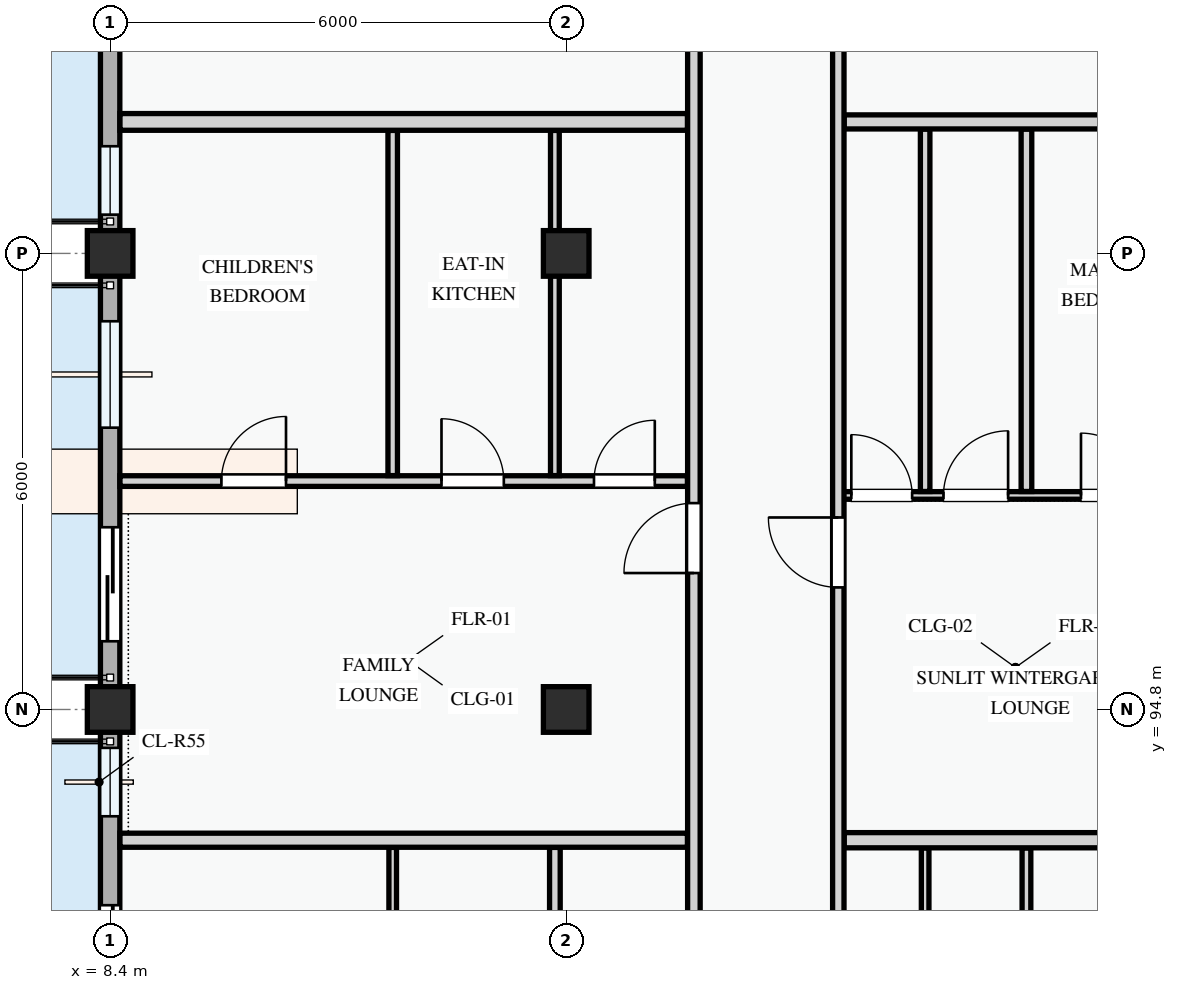
"""IFC4 building model, lengths in metres.
Left out: names, types, materials, properties, quantities, classifications, styles, units other than length and angle.
Written with IfcOpenShell. Run it as: python <this file> out.ifc"""

import sys

from ifc_helpers import new_model, si_unit, direction, frame, frame_2d, origin, origin_2d, place, context, subcontext, project, spatial, rectangle, extrude, element, fill, save


model = new_model("IFC4")
c1 = context("Model", 3, precision=1e-05, world=origin(), true_north=direction((0.0, 1.0)))
c2 = subcontext(c1, "Body", "Model", "MODEL_VIEW")
j1 = project(units=[si_unit("LENGTHUNIT", "METRE"), si_unit("PLANEANGLEUNIT", "RADIAN")], contexts=[c1])
p1 = place(None, origin())
s1 = spatial("IfcSite", under=j1, at=p1, CompositionType="ELEMENT")
p2 = place(p1, origin())
s2 = spatial("IfcBuilding", under=s1, at=p2, CompositionType="ELEMENT")
p3 = place(p2, frame((0.0, 0.0, 37.8)))
s3 = spatial("IfcBuildingStorey", under=s2, at=p3, CompositionType="ELEMENT", Elevation=37.8)
for number, where, z_axis, x_axis in (
    (1, (8.4, 94.8, 0.0), (0.0, 0.0, 1.0), (1.0, 0.0, 0.0)),
    (2, (8.4, 100.8, 0.0), (0.0, 0.0, 1.0), (1.0, 0.0, 0.0)),
    (3, (14.4, 94.8, 0.0), (0.0, 0.0, 1.0), (1.0, 0.0, 0.0)),
    (4, (14.4, 100.8, 0.0), (0.0, 0.0, 1.0), (1.0, 0.0, 0.0)),
):
    element("IfcColumn", number, at=place(p3, frame(where, z_axis=z_axis, x_axis=x_axis)), inside=s3, PredefinedType="COLUMN", context=c2, shape_type="SweptSolid", body=[
        extrude(rectangle(XDim=0.6, YDim=0.6, at=origin_2d()), origin(), (0.0, 0.0, 1.0), 3.3),
    ])
p4 = place(p3, frame((8.4, 109.2, 0.0), z_axis=(0.0, 0.0, 1.0), x_axis=(0.0, -1.0, 0.0)))
e5 = element("IfcWall", 5, at=p4, inside=s3, PredefinedType="STANDARD", context=c2, shape_type="SweptSolid", body=[
    extrude(rectangle(XDim=8.4, YDim=0.255, at=frame_2d((4.2, 0.0))), origin(), (0.0, 0.0, 1.0), 2.425),
])
p5 = place(p4, frame((4.268, 0.0, 0.0)))
e6 = element("IfcOpeningElement", 6, at=p5, cuts=e5, PredefinedType="OPENING", context=c2, shape_type="SweptSolid", body=[
    extrude(rectangle(XDim=1.4, YDim=2.2, at=frame_2d((0.7, 1.1))), frame((0.0, 0.137, 0.0), z_axis=(0.0, -1.0, 0.0), x_axis=(1.0, 0.0, 0.0)), (0.0, 0.0, 1.0), 0.275),
])
p6 = place(p4, frame((0.488, 0.0, 0.78)))
e7 = element("IfcOpeningElement", 7, at=p6, cuts=e5, PredefinedType="OPENING", context=c2, shape_type="SweptSolid", body=[
    extrude(rectangle(XDim=2.48, YDim=1.46, at=frame_2d((1.24, 0.73))), frame((0.0, 0.137, 0.0), z_axis=(0.0, -1.0, 0.0), x_axis=(1.0, 0.0, 0.0)), (0.0, 0.0, 1.0), 0.275),
])
p7 = place(p4, frame((6.99, 0.0, 0.78)))
e8 = element("IfcOpeningElement", 8, at=p7, cuts=e5, PredefinedType="OPENING", context=c2, shape_type="SweptSolid", body=[
    extrude(rectangle(XDim=0.9, YDim=1.2, at=frame_2d((0.45, 0.6))), frame((0.0, 0.137, 0.0), z_axis=(0.0, -1.0, 0.0), x_axis=(1.0, 0.0, 0.0)), (0.0, 0.0, 1.0), 0.275),
])
p8 = place(p3, frame((8.4, 100.8, 0.0), z_axis=(0.0, 0.0, 1.0), x_axis=(0.0, -1.0, 0.0)))
e9 = element("IfcWall", 9, at=p8, inside=s3, PredefinedType="STANDARD", context=c2, shape_type="SweptSolid", body=[
    extrude(rectangle(XDim=6.0, YDim=0.255, at=frame_2d((3.0, 0.0))), origin(), (0.0, 0.0, 1.0), 2.575),
])
p9 = place(p8, frame((3.603, 0.0, 0.0)))
e10 = element("IfcOpeningElement", 10, at=p9, cuts=e9, PredefinedType="OPENING", context=c2, shape_type="SweptSolid", body=[
    extrude(rectangle(XDim=1.5, YDim=2.2, at=frame_2d((0.75, 1.1))), frame((0.0, 0.137, 0.0), z_axis=(0.0, -1.0, 0.0), x_axis=(1.0, 0.0, 0.0)), (0.0, 0.0, 1.0), 0.275),
])
p10 = place(p8, frame((0.893, 0.0, 0.78)))
e11 = element("IfcOpeningElement", 11, at=p10, cuts=e9, PredefinedType="OPENING", context=c2, shape_type="SweptSolid", body=[
    extrude(rectangle(XDim=1.4, YDim=1.45, at=frame_2d((0.7, 0.725))), frame((0.0, 0.137, 0.0), z_axis=(0.0, -1.0, 0.0), x_axis=(1.0, 0.0, 0.0)), (0.0, 0.0, 1.0), 0.275),
])
p11 = place(p3, frame((8.4, 94.8, 0.0), z_axis=(0.0, 0.0, 1.0), x_axis=(0.0, -1.0, 0.0)))
e12 = element("IfcWall", 12, at=p11, inside=s3, PredefinedType="STANDARD", context=c2, shape_type="SweptSolid", body=[
    extrude(rectangle(XDim=8.4, YDim=0.255, at=frame_2d((4.2, 0.0))), origin(), (0.0, 0.0, 1.0), 2.425),
])
p12 = place(p11, frame((2.575, 0.0, 0.0)))
e13 = element("IfcOpeningElement", 13, at=p12, cuts=e12, PredefinedType="OPENING", context=c2, shape_type="SweptSolid", body=[
    extrude(rectangle(XDim=1.6, YDim=2.2, at=frame_2d((0.8, 1.1))), frame((0.0, 0.137, 0.0), z_axis=(0.0, -1.0, 0.0), x_axis=(1.0, 0.0, 0.0)), (0.0, 0.0, 1.0), 0.275),
])
p13 = place(p11, frame((0.505, 0.0, 0.78)))
e14 = element("IfcOpeningElement", 14, at=p13, cuts=e12, PredefinedType="OPENING", context=c2, shape_type="SweptSolid", body=[
    extrude(rectangle(XDim=0.9, YDim=1.2, at=frame_2d((0.45, 0.6))), frame((0.0, 0.137, 0.0), z_axis=(0.0, -1.0, 0.0), x_axis=(1.0, 0.0, 0.0)), (0.0, 0.0, 1.0), 0.275),
])
p14 = place(p11, frame((5.38, 0.0, 0.78)))
e15 = element("IfcOpeningElement", 15, at=p14, cuts=e12, PredefinedType="OPENING", context=c2, shape_type="SweptSolid", body=[
    extrude(rectangle(XDim=2.48, YDim=1.46, at=frame_2d((1.24, 0.73))), frame((0.0, 0.137, 0.0), z_axis=(0.0, -1.0, 0.0), x_axis=(1.0, 0.0, 0.0)), (0.0, 0.0, 1.0), 0.275),
])
p15 = place(p3, frame((12.118, 89.83, 0.0), z_axis=(0.0, 0.0, 1.0), x_axis=(0.0, 1.0, 0.0)))
e16 = element("IfcWall", 16, at=p15, inside=s3, PredefinedType="PARTITIONING", context=c2, shape_type="SweptSolid", body=[
    extrude(rectangle(XDim=3.156, YDim=0.1, at=frame_2d((1.578, 0.0))), origin(), (0.0, 0.0, 1.0), 3.0),
])
p16 = place(p3, frame((14.251, 89.83, 0.0), z_axis=(0.0, 0.0, 1.0), x_axis=(0.0, 1.0, 0.0)))
e17 = element("IfcWall", 17, at=p16, inside=s3, PredefinedType="PARTITIONING", context=c2, shape_type="SweptSolid", body=[
    extrude(rectangle(XDim=3.156, YDim=0.14, at=frame_2d((1.578, 0.0))), origin(), (0.0, 0.0, 1.0), 2.425),
])
p17 = place(p3, frame((20.455, 89.702, 0.0), z_axis=(0.0, 0.0, 1.0), x_axis=(0.0, 1.0, 0.0)))
e18 = element("IfcWall", 18, at=p17, inside=s3, PredefinedType="PARTITIONING", context=c2, shape_type="SweptSolid", body=[
    extrude(rectangle(XDim=3.276, YDim=0.115, at=frame_2d((1.638, 0.0))), origin(), (0.0, 0.0, 1.0), 3.0),
])
p18 = place(p3, frame((19.122, 89.702, 0.0), z_axis=(0.0, 0.0, 1.0), x_axis=(0.0, 1.0, 0.0)))
e19 = element("IfcWall", 19, at=p18, inside=s3, PredefinedType="PARTITIONING", context=c2, shape_type="SweptSolid", body=[
    extrude(rectangle(XDim=3.276, YDim=0.1, at=frame_2d((1.638, 0.0))), origin(), (0.0, 0.0, 1.0), 3.0),
])
p19 = place(p3, frame((8.53, 97.805, 0.0), z_axis=(0.0, 0.0, 1.0), x_axis=(1.0, 0.0, 0.0)))
e20 = element("IfcWall", 20, at=p19, inside=s3, PredefinedType="PARTITIONING", context=c2, shape_type="SweptSolid", body=[
    extrude(rectangle(XDim=7.466, YDim=0.14, at=frame_2d((3.733, 0.0))), origin(), (0.0, 0.0, 1.0), 3.0),
])
p20 = place(p19, frame((1.334, 0.0, 0.0)))
e21 = element("IfcOpeningElement", 21, at=p20, cuts=e20, PredefinedType="OPENING", context=c2, shape_type="SweptSolid", body=[
    extrude(rectangle(XDim=0.85, YDim=2.1, at=frame_2d((0.425, 1.05))), frame((0.0, 0.08, 0.0), z_axis=(0.0, -1.0, 0.0), x_axis=(1.0, 0.0, 0.0)), (0.0, 0.0, 1.0), 0.16),
])
p21 = place(p19, frame((4.23, 0.0, 0.0)))
e22 = element("IfcOpeningElement", 22, at=p21, cuts=e20, PredefinedType="OPENING", context=c2, shape_type="SweptSolid", body=[
    extrude(rectangle(XDim=0.82, YDim=2.08, at=frame_2d((0.41, 1.04))), frame((0.0, 0.08, 0.0), z_axis=(0.0, -1.0, 0.0), x_axis=(1.0, 0.0, 0.0)), (0.0, 0.0, 1.0), 0.16),
])
p22 = place(p19, frame((6.236, 0.0, 0.0)))
e23 = element("IfcOpeningElement", 23, at=p22, cuts=e20, PredefinedType="OPENING", context=c2, shape_type="SweptSolid", body=[
    extrude(rectangle(XDim=0.8, YDim=2.1, at=frame_2d((0.4, 1.05))), frame((0.0, 0.08, 0.0), z_axis=(0.0, -1.0, 0.0), x_axis=(1.0, 0.0, 0.0)), (0.0, 0.0, 1.0), 0.16),
])
p23 = place(p3, frame((12.118, 97.877, 0.0), z_axis=(0.0, 0.0, 1.0), x_axis=(0.0, 1.0, 0.0)))
e24 = element("IfcWall", 24, at=p23, inside=s3, PredefinedType="PARTITIONING", context=c2, shape_type="SweptSolid", body=[
    extrude(rectangle(XDim=4.541, YDim=0.125, at=frame_2d((2.271, 0.0))), origin(), (0.0, 0.0, 1.0), 3.0),
])
p24 = place(p3, frame((14.251, 97.877, 0.0), z_axis=(0.0, 0.0, 1.0), x_axis=(0.0, 1.0, 0.0)))
e25 = element("IfcWall", 25, at=p24, inside=s3, PredefinedType="PARTITIONING", context=c2, shape_type="SweptSolid", body=[
    extrude(rectangle(XDim=4.541, YDim=0.115, at=frame_2d((2.271, 0.0))), origin(), (0.0, 0.0, 1.0), 2.425),
])
p25 = place(p3, frame((17.98, 97.616, 0.0), z_axis=(0.0, 0.0, 1.0), x_axis=(1.0, 0.0, 0.0)))
e26 = element("IfcWall", 26, at=p25, inside=s3, PredefinedType="PARTITIONING", context=c2, shape_type="SweptSolid", body=[
    extrude(rectangle(XDim=4.76, YDim=0.1, at=frame_2d((2.38, 0.0))), origin(), (0.0, 0.0, 1.0), 3.0),
])
p26 = place(p25, frame((0.171, 0.0, 0.0)))
e27 = element("IfcOpeningElement", 27, at=p26, cuts=e26, PredefinedType="OPENING", context=c2, shape_type="SweptSolid", body=[
    extrude(rectangle(XDim=0.8, YDim=2.1, at=frame_2d((0.4, 1.05))), frame((0.0, 0.06, 0.0), z_axis=(0.0, -1.0, 0.0), x_axis=(1.0, 0.0, 0.0)), (0.0, 0.0, 1.0), 0.12),
])
p27 = place(p25, frame((1.384, 0.0, 0.0)))
e28 = element("IfcOpeningElement", 28, at=p27, cuts=e26, PredefinedType="OPENING", context=c2, shape_type="SweptSolid", body=[
    extrude(rectangle(XDim=0.85, YDim=2.1, at=frame_2d((0.425, 1.05))), frame((0.0, 0.06, 0.0), z_axis=(0.0, -1.0, 0.0), x_axis=(1.0, 0.0, 0.0)), (0.0, 0.0, 1.0), 0.12),
])
p28 = place(p25, frame((3.193, 0.0, 0.0)))
e29 = element("IfcOpeningElement", 29, at=p28, cuts=e26, PredefinedType="OPENING", context=c2, shape_type="SweptSolid", body=[
    extrude(rectangle(XDim=0.82, YDim=2.08, at=frame_2d((0.41, 1.04))), frame((0.0, 0.06, 0.0), z_axis=(0.0, -1.0, 0.0), x_axis=(1.0, 0.0, 0.0)), (0.0, 0.0, 1.0), 0.12),
])
p29 = place(p3, frame((20.455, 97.668, 0.0), z_axis=(0.0, 0.0, 1.0), x_axis=(0.0, 1.0, 0.0)))
e30 = element("IfcWall", 30, at=p29, inside=s3, PredefinedType="PARTITIONING", context=c2, shape_type="SweptSolid", body=[
    extrude(rectangle(XDim=4.768, YDim=0.14, at=frame_2d((2.384, 0.0))), origin(), (0.0, 0.0, 1.0), 3.0),
])
p30 = place(p3, frame((19.122, 97.668, 0.0), z_axis=(0.0, 0.0, 1.0), x_axis=(0.0, 1.0, 0.0)))
e31 = element("IfcWall", 31, at=p30, inside=s3, PredefinedType="PARTITIONING", context=c2, shape_type="SweptSolid", body=[
    extrude(rectangle(XDim=4.768, YDim=0.125, at=frame_2d((2.384, 0.0))), origin(), (0.0, 0.0, 1.0), 3.0),
])
p31 = place(p3, frame((8.53, 93.08, 0.0), z_axis=(0.0, 0.0, 1.0), x_axis=(1.0, 0.0, 0.0)))
e32 = element("IfcWall", 32, at=p31, inside=s3, PredefinedType="PARTITIONING", context=c2, shape_type="SweptSolid", body=[
    extrude(rectangle(XDim=7.466, YDim=0.185, at=frame_2d((3.733, 0.0))), origin(), (0.0, 0.0, 1.0), 3.0),
])
p32 = place(p3, frame((18.057, 93.08, 0.0), z_axis=(0.0, 0.0, 1.0), x_axis=(1.0, 0.0, 0.0)))
e33 = element("IfcWall", 33, at=p32, inside=s3, PredefinedType="PARTITIONING", context=c2, shape_type="SweptSolid", body=[
    extrude(rectangle(XDim=4.614, YDim=0.2, at=frame_2d((2.307, 0.0))), origin(), (0.0, 0.0, 1.0), 3.0),
])
p33 = place(p3, frame((8.53, 102.53, 0.0), z_axis=(0.0, 0.0, 1.0), x_axis=(1.0, 0.0, 0.0)))
e34 = element("IfcWall", 34, at=p33, inside=s3, PredefinedType="PARTITIONING", context=c2, shape_type="SweptSolid", body=[
    extrude(rectangle(XDim=7.466, YDim=0.22, at=frame_2d((3.733, 0.0))), origin(), (0.0, 0.0, 1.0), 3.0),
])
p34 = place(p3, frame((18.057, 102.53, 0.0), z_axis=(0.0, 0.0, 1.0), x_axis=(1.0, 0.0, 0.0)))
e35 = element("IfcWall", 35, at=p34, inside=s3, PredefinedType="PARTITIONING", context=c2, shape_type="SweptSolid", body=[
    extrude(rectangle(XDim=4.614, YDim=0.185, at=frame_2d((2.307, 0.0))), origin(), (0.0, 0.0, 1.0), 3.0),
])
p35 = place(p3, frame((16.08, 86.46, 0.0), z_axis=(0.0, 0.0, 1.0), x_axis=(0.0, 1.0, 0.0)))
e36 = element("IfcWall", 36, at=p35, inside=s3, PredefinedType="PARTITIONING", context=c2, shape_type="SweptSolid", body=[
    extrude(rectangle(XDim=22.88, YDim=0.165, at=frame_2d((11.44, 0.0))), origin(), (0.0, 0.0, 1.0), 3.0),
])
p36 = place(p35, frame((2.1, 0.0, 0.0)))
e37 = element("IfcOpeningElement", 37, at=p36, cuts=e36, PredefinedType="OPENING", context=c2, shape_type="SweptSolid", body=[
    extrude(rectangle(XDim=0.92, YDim=2.1, at=frame_2d((0.46, 1.05))), frame((0.0, 0.093, 0.0), z_axis=(0.0, -1.0, 0.0), x_axis=(1.0, 0.0, 0.0)), (0.0, 0.0, 1.0), 0.185),
])
p37 = place(p35, frame((10.135, 0.0, 0.0)))
e38 = element("IfcOpeningElement", 38, at=p37, cuts=e36, PredefinedType="OPENING", context=c2, shape_type="SweptSolid", body=[
    extrude(rectangle(XDim=0.92, YDim=2.1, at=frame_2d((0.46, 1.05))), frame((0.0, 0.093, 0.0), z_axis=(0.0, -1.0, 0.0), x_axis=(1.0, 0.0, 0.0)), (0.0, 0.0, 1.0), 0.185),
])
p38 = place(p35, frame((18.083, 0.0, 0.0)))
e39 = element("IfcOpeningElement", 39, at=p38, cuts=e36, PredefinedType="OPENING", context=c2, shape_type="SweptSolid", body=[
    extrude(rectangle(XDim=0.92, YDim=2.1, at=frame_2d((0.46, 1.05))), frame((0.0, 0.093, 0.0), z_axis=(0.0, -1.0, 0.0), x_axis=(1.0, 0.0, 0.0)), (0.0, 0.0, 1.0), 0.185),
])
p39 = place(p3, frame((17.98, 86.46, 0.0), z_axis=(0.0, 0.0, 1.0), x_axis=(0.0, 1.0, 0.0)))
e40 = element("IfcWall", 40, at=p39, inside=s3, PredefinedType="PARTITIONING", context=c2, shape_type="SweptSolid", body=[
    extrude(rectangle(XDim=22.88, YDim=0.15, at=frame_2d((11.44, 0.0))), origin(), (0.0, 0.0, 1.0), 3.0),
])
p40 = place(p39, frame((1.968, 0.0, 0.0)))
e41 = element("IfcOpeningElement", 41, at=p40, cuts=e40, PredefinedType="OPENING", context=c2, shape_type="SweptSolid", body=[
    extrude(rectangle(XDim=0.96, YDim=2.12, at=frame_2d((0.48, 1.06))), frame((0.0, 0.085, 0.0), z_axis=(0.0, -1.0, 0.0), x_axis=(1.0, 0.0, 0.0)), (0.0, 0.0, 1.0), 0.17),
])
p41 = place(p39, frame((9.946, 0.0, 0.0)))
e42 = element("IfcOpeningElement", 42, at=p41, cuts=e40, PredefinedType="OPENING", context=c2, shape_type="SweptSolid", body=[
    extrude(rectangle(XDim=0.92, YDim=2.1, at=frame_2d((0.46, 1.05))), frame((0.0, 0.085, 0.0), z_axis=(0.0, -1.0, 0.0), x_axis=(1.0, 0.0, 0.0)), (0.0, 0.0, 1.0), 0.17),
])
p42 = place(p39, frame((18.072, 0.0, 0.0)))
e43 = element("IfcOpeningElement", 43, at=p42, cuts=e40, PredefinedType="OPENING", context=c2, shape_type="SweptSolid", body=[
    extrude(rectangle(XDim=0.92, YDim=2.1, at=frame_2d((0.46, 1.05))), frame((0.0, 0.085, 0.0), z_axis=(0.0, -1.0, 0.0), x_axis=(1.0, 0.0, 0.0)), (0.0, 0.0, 1.0), 0.17),
])
p43 = place(p7, origin())
e44 = element("IfcWindow", 44, at=p43, inside=s3, PartitioningType="SINGLE_PANEL", PredefinedType="WINDOW", context=c2, shape_type="SweptSolid", body=[
    extrude(rectangle(XDim=0.9, YDim=1.2, at=frame_2d((0.45, 0.6))), frame((0.0, 0.03, 0.0), z_axis=(0.0, -1.0, 0.0), x_axis=(1.0, 0.0, 0.0)), (0.0, 0.0, 1.0), 0.06),
])
fill(e8, e44)
p44 = place(p9, frame((1.5, 0.0, 0.0), z_axis=(0.0, 0.0, 1.0), x_axis=(-1.0, 0.0, 0.0)))
e45 = element("IfcDoor", 45, at=p44, inside=s3, OperationType="SLIDING_TO_RIGHT", PredefinedType="DOOR", context=c2, shape_type="SweptSolid", body=[
    extrude(rectangle(XDim=1.5, YDim=2.2, at=frame_2d((0.75, 1.1))), frame((0.0, 0.025, 0.0), z_axis=(0.0, -1.0, 0.0), x_axis=(1.0, 0.0, 0.0)), (0.0, 0.0, 1.0), 0.05),
])
fill(e10, e45)
p45 = place(p10, origin())
e46 = element("IfcWindow", 46, at=p45, inside=s3, PartitioningType="SINGLE_PANEL", PredefinedType="WINDOW", context=c2, shape_type="SweptSolid", body=[
    extrude(rectangle(XDim=1.4, YDim=1.45, at=frame_2d((0.7, 0.725))), frame((0.0, 0.03, 0.0), z_axis=(0.0, -1.0, 0.0), x_axis=(1.0, 0.0, 0.0)), (0.0, 0.0, 1.0), 0.06),
])
fill(e11, e46)
p46 = place(p12, frame((1.6, 0.0, 0.0), z_axis=(0.0, 0.0, 1.0), x_axis=(-1.0, 0.0, 0.0)))
e47 = element("IfcDoor", 47, at=p46, inside=s3, OperationType="SLIDING_TO_LEFT", PredefinedType="DOOR", context=c2, shape_type="SweptSolid", body=[
    extrude(rectangle(XDim=1.6, YDim=2.2, at=frame_2d((0.8, 1.1))), frame((0.0, 0.025, 0.0), z_axis=(0.0, -1.0, 0.0), x_axis=(1.0, 0.0, 0.0)), (0.0, 0.0, 1.0), 0.05),
])
fill(e13, e47)
p47 = place(p13, origin())
e48 = element("IfcWindow", 48, at=p47, inside=s3, PartitioningType="SINGLE_PANEL", PredefinedType="WINDOW", context=c2, shape_type="SweptSolid", body=[
    extrude(rectangle(XDim=0.9, YDim=1.2, at=frame_2d((0.45, 0.6))), frame((0.0, 0.03, 0.0), z_axis=(0.0, -1.0, 0.0), x_axis=(1.0, 0.0, 0.0)), (0.0, 0.0, 1.0), 0.06),
])
fill(e14, e48)
p48 = place(p20, origin())
e49 = element("IfcDoor", 49, at=p48, inside=s3, OperationType="SINGLE_SWING_RIGHT", PredefinedType="DOOR", context=c2, shape_type="SweptSolid", body=[
    extrude(rectangle(XDim=0.85, YDim=2.1, at=frame_2d((0.425, 1.05))), frame((0.0, 0.025, 0.0), z_axis=(0.0, -1.0, 0.0), x_axis=(1.0, 0.0, 0.0)), (0.0, 0.0, 1.0), 0.05),
])
fill(e21, e49)
p49 = place(p21, origin())
e50 = element("IfcDoor", 50, at=p49, inside=s3, OperationType="SINGLE_SWING_LEFT", PredefinedType="DOOR", context=c2, shape_type="SweptSolid", body=[
    extrude(rectangle(XDim=0.82, YDim=2.08, at=frame_2d((0.41, 1.04))), frame((0.0, 0.025, 0.0), z_axis=(0.0, -1.0, 0.0), x_axis=(1.0, 0.0, 0.0)), (0.0, 0.0, 1.0), 0.05),
])
fill(e22, e50)
p50 = place(p22, origin())
e51 = element("IfcDoor", 51, at=p50, inside=s3, OperationType="SINGLE_SWING_RIGHT", PredefinedType="DOOR", context=c2, shape_type="SweptSolid", body=[
    extrude(rectangle(XDim=0.8, YDim=2.1, at=frame_2d((0.4, 1.05))), frame((0.0, 0.025, 0.0), z_axis=(0.0, -1.0, 0.0), x_axis=(1.0, 0.0, 0.0)), (0.0, 0.0, 1.0), 0.05),
])
fill(e23, e51)
p51 = place(p26, origin())
e52 = element("IfcDoor", 52, at=p51, inside=s3, OperationType="SINGLE_SWING_LEFT", PredefinedType="DOOR", context=c2, shape_type="SweptSolid", body=[
    extrude(rectangle(XDim=0.8, YDim=2.1, at=frame_2d((0.4, 1.05))), frame((0.0, 0.025, 0.0), z_axis=(0.0, -1.0, 0.0), x_axis=(1.0, 0.0, 0.0)), (0.0, 0.0, 1.0), 0.05),
])
fill(e27, e52)
p52 = place(p27, origin())
e53 = element("IfcDoor", 53, at=p52, inside=s3, OperationType="SINGLE_SWING_RIGHT", PredefinedType="DOOR", context=c2, shape_type="SweptSolid", body=[
    extrude(rectangle(XDim=0.85, YDim=2.1, at=frame_2d((0.425, 1.05))), frame((0.0, 0.025, 0.0), z_axis=(0.0, -1.0, 0.0), x_axis=(1.0, 0.0, 0.0)), (0.0, 0.0, 1.0), 0.05),
])
fill(e28, e53)
p53 = place(p28, origin())
e54 = element("IfcDoor", 54, at=p53, inside=s3, OperationType="SINGLE_SWING_LEFT", PredefinedType="DOOR", context=c2, shape_type="SweptSolid", body=[
    extrude(rectangle(XDim=0.82, YDim=2.08, at=frame_2d((0.41, 1.04))), frame((0.0, 0.025, 0.0), z_axis=(0.0, -1.0, 0.0), x_axis=(1.0, 0.0, 0.0)), (0.0, 0.0, 1.0), 0.05),
])
fill(e29, e54)
p54 = place(p37, origin())
e55 = element("IfcDoor", 55, at=p54, inside=s3, OperationType="SINGLE_SWING_LEFT", PredefinedType="DOOR", context=c2, shape_type="SweptSolid", body=[
    extrude(rectangle(XDim=0.92, YDim=2.1, at=frame_2d((0.46, 1.05))), frame((0.0, 0.025, 0.0), z_axis=(0.0, -1.0, 0.0), x_axis=(1.0, 0.0, 0.0)), (0.0, 0.0, 1.0), 0.05),
])
fill(e38, e55)
p55 = place(p41, origin())
e56 = element("IfcDoor", 56, at=p55, inside=s3, OperationType="SINGLE_SWING_RIGHT", PredefinedType="DOOR", context=c2, shape_type="SweptSolid", body=[
    extrude(rectangle(XDim=0.92, YDim=2.1, at=frame_2d((0.46, 1.05))), frame((0.0, 0.025, 0.0), z_axis=(0.0, -1.0, 0.0), x_axis=(1.0, 0.0, 0.0)), (0.0, 0.0, 1.0), 0.05),
])
fill(e42, e56)
save(model, sys.argv[1])
